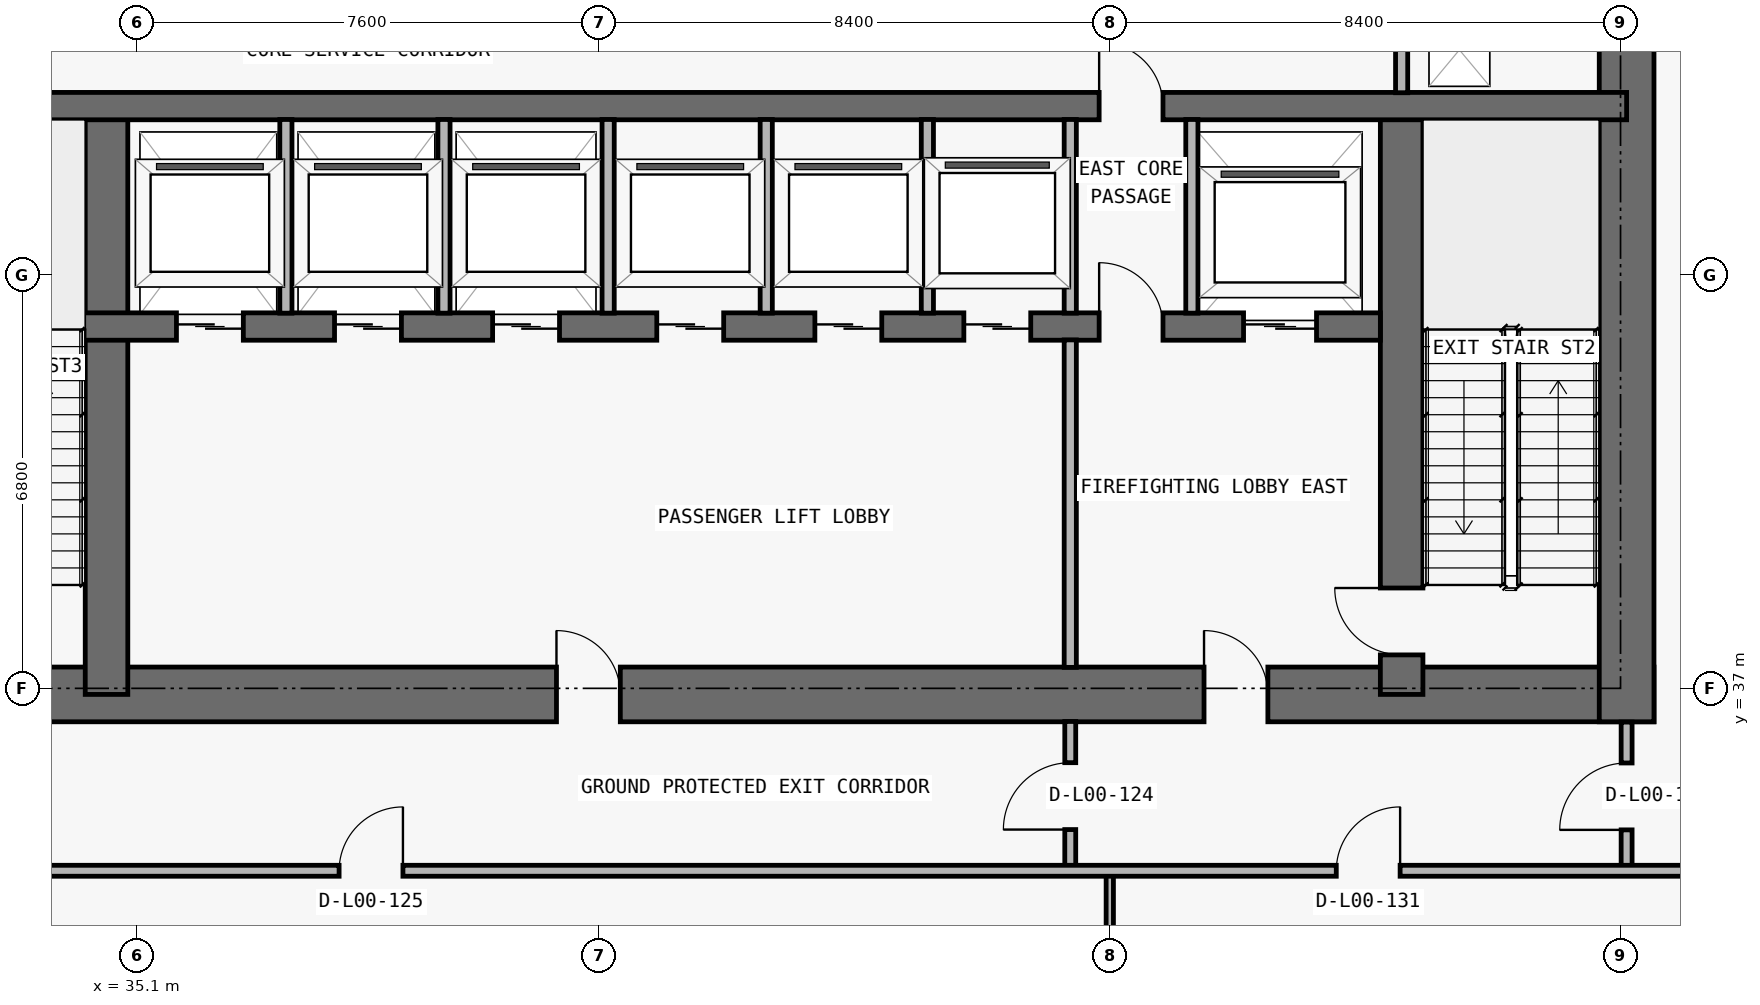
"""IFC4 building model, lengths in metres.
Left out: names, types, materials, properties, quantities, classifications, styles, units other than length and angle.
Written with IfcOpenShell. Run it as: python <this file> out.ifc"""

import sys

from ifc_helpers import new_model, si_unit, direction, frame, frame_2d, origin, place, context, subcontext, project, spatial, rectangle, extrude, element, fill, save


model = new_model("IFC4")
c1 = context("Model", 3, precision=1e-05, world=origin(), true_north=direction((0.0, 1.0)))
c2 = subcontext(c1, "Body", "Model", "MODEL_VIEW")
j1 = project(units=[si_unit("LENGTHUNIT", "METRE"), si_unit("PLANEANGLEUNIT", "RADIAN")], contexts=[c1])
p1 = place(None, origin())
s1 = spatial("IfcSite", under=j1, at=p1, CompositionType="ELEMENT")
p2 = place(p1, origin())
s2 = spatial("IfcBuilding", under=s1, at=p2, CompositionType="ELEMENT")
p3 = place(p2, origin())
s3 = spatial("IfcBuildingStorey", under=s2, at=p3, CompositionType="ELEMENT", Elevation=0.0)
p4 = place(p3, frame((17.75, 36.9, 0.0), z_axis=(0.0, 0.0, 1.0), x_axis=(1.0, 0.0, 0.0)))
e1 = element("IfcWall", 1, at=p4, inside=s3, PredefinedType="SHEAR", context=c2, shape_type="SweptSolid", body=[
    extrude(rectangle(XDim=42.3, YDim=0.9, at=frame_2d((21.15, 0.0))), origin(), (0.0, 0.0, 1.0), 5.1),
])
p5 = place(p4, frame((14.55, 0.0, 0.0)))
e2 = element("IfcOpeningElement", 2, at=p5, cuts=e1, PredefinedType="OPENING", context=c2, shape_type="SweptSolid", body=[
    extrude(rectangle(XDim=1.1, YDim=2.15, at=frame_2d((0.55, 1.075))), frame((0.0, 0.46, 0.0), z_axis=(0.0, -1.0, 0.0), x_axis=(1.0, 0.0, 0.0)), (0.0, 0.0, 1.0), 0.92),
])
p6 = place(p4, frame((6.4, 0.0, 0.0)))
e3 = element("IfcOpeningElement", 3, at=p6, cuts=e1, PredefinedType="OPENING", context=c2, shape_type="SweptSolid", body=[
    extrude(rectangle(XDim=1.05, YDim=2.15, at=frame_2d((0.525, 1.075))), frame((0.0, 0.46, 0.0), z_axis=(0.0, -1.0, 0.0), x_axis=(1.0, 0.0, 0.0)), (0.0, 0.0, 1.0), 0.92),
])
p7 = place(p4, frame((34.9, 0.0, 0.0)))
e4 = element("IfcOpeningElement", 4, at=p7, cuts=e1, PredefinedType="OPENING", context=c2, shape_type="SweptSolid", body=[
    extrude(rectangle(XDim=1.05, YDim=2.15, at=frame_2d((0.525, 1.075))), frame((0.0, 0.46, 0.0), z_axis=(0.0, -1.0, 0.0), x_axis=(1.0, 0.0, 0.0)), (0.0, 0.0, 1.0), 0.92),
])
p8 = place(p4, frame((11.012, 0.0, 0.0)))
e5 = element("IfcOpeningElement", 5, at=p8, cuts=e1, PredefinedType="OPENING", context=c2, shape_type="SweptSolid", body=[
    extrude(rectangle(XDim=1.05, YDim=2.15, at=frame_2d((0.525, 1.075))), frame((0.0, 0.46, 0.0), z_axis=(0.0, -1.0, 0.0), x_axis=(1.0, 0.0, 0.0)), (0.0, 0.0, 1.0), 0.92),
])
p9 = place(p4, frame((24.25, 0.0, 0.0)))
e6 = element("IfcOpeningElement", 6, at=p9, cuts=e1, PredefinedType="OPENING", context=c2, shape_type="SweptSolid", body=[
    extrude(rectangle(XDim=1.05, YDim=2.15, at=frame_2d((0.525, 1.075))), frame((0.0, 0.46, 0.0), z_axis=(0.0, -1.0, 0.0), x_axis=(1.0, 0.0, 0.0)), (0.0, 0.0, 1.0), 0.92),
])
p10 = place(p3, frame((59.6, 36.45, 0.0), z_axis=(0.0, 0.0, 1.0), x_axis=(0.0, 1.0, 0.0)))
e7 = element("IfcWall", 7, at=p10, inside=s3, PredefinedType="SHEAR", context=c2, shape_type="SweptSolid", body=[
    extrude(rectangle(XDim=14.15, YDim=0.9, at=frame_2d((7.075, 0.0))), origin(), (0.0, 0.0, 1.0), 5.1),
])
p11 = place(p3, frame((55.9, 36.9, 0.0), z_axis=(0.0, 0.0, 1.0), x_axis=(0.0, 1.0, 0.0)))
e8 = element("IfcWall", 8, at=p11, inside=s3, PredefinedType="SHEAR", context=c2, shape_type="SweptSolid", body=[
    extrude(rectangle(XDim=9.675, YDim=0.7, at=frame_2d((4.837, 0.0))), origin(), (0.0, 0.0, 1.0), 5.1),
])
p12 = place(p11, frame((0.65, 0.0, 0.0)))
e9 = element("IfcOpeningElement", 9, at=p12, cuts=e8, PredefinedType="OPENING", context=c2, shape_type="SweptSolid", body=[
    extrude(rectangle(XDim=1.1, YDim=2.15, at=frame_2d((0.55, 1.075))), frame((0.0, 0.36, 0.0), z_axis=(0.0, -1.0, 0.0), x_axis=(1.0, 0.0, 0.0)), (0.0, 0.0, 1.0), 0.72),
])
p13 = place(p3, frame((34.6, 36.9, 0.0), z_axis=(0.0, 0.0, 1.0), x_axis=(0.0, 1.0, 0.0)))
e10 = element("IfcWall", 10, at=p13, inside=s3, PredefinedType="SHEAR", context=c2, shape_type="SweptSolid", body=[
    extrude(rectangle(XDim=9.675, YDim=0.7, at=frame_2d((4.837, 0.0))), origin(), (0.0, 0.0, 1.0), 5.1),
])
p14 = place(p3, frame((22.25, 42.95, 0.0), z_axis=(0.0, 0.0, 1.0), x_axis=(1.0, 0.0, 0.0)))
e11 = element("IfcWall", 11, at=p14, inside=s3, PredefinedType="SHEAR", context=c2, shape_type="SweptSolid", body=[
    extrude(rectangle(XDim=33.3, YDim=0.45, at=frame_2d((16.65, 0.0))), origin(), (0.0, 0.0, 1.0), 5.1),
])
p15 = place(p14, frame((1.05, 0.0, 0.0)))
e12 = element("IfcOpeningElement", 12, at=p15, cuts=e11, PredefinedType="OPENING", context=c2, shape_type="SweptSolid", body=[
    extrude(rectangle(XDim=1.2, YDim=2.2, at=frame_2d((0.6, 1.1))), frame((0.0, 0.235, 0.0), z_axis=(0.0, -1.0, 0.0), x_axis=(1.0, 0.0, 0.0)), (0.0, 0.0, 1.0), 0.47),
])
p16 = place(p14, frame((31.05, 0.0, 0.0)))
e13 = element("IfcOpeningElement", 13, at=p16, cuts=e11, PredefinedType="OPENING", context=c2, shape_type="SweptSolid", body=[
    extrude(rectangle(XDim=1.2, YDim=2.2, at=frame_2d((0.6, 1.1))), frame((0.0, 0.235, 0.0), z_axis=(0.0, -1.0, 0.0), x_axis=(1.0, 0.0, 0.0)), (0.0, 0.0, 1.0), 0.47),
])
p17 = place(p14, frame((13.5, 0.0, 0.0)))
e14 = element("IfcOpeningElement", 14, at=p17, cuts=e11, PredefinedType="OPENING", context=c2, shape_type="SweptSolid", body=[
    extrude(rectangle(XDim=1.1, YDim=2.2, at=frame_2d((0.55, 1.1))), frame((0.0, 0.235, 0.0), z_axis=(0.0, -1.0, 0.0), x_axis=(1.0, 0.0, 0.0)), (0.0, 0.0, 1.0), 0.47),
])
p18 = place(p14, frame((16.1, 0.0, 0.0)))
e15 = element("IfcOpeningElement", 15, at=p18, cuts=e11, PredefinedType="OPENING", context=c2, shape_type="SweptSolid", body=[
    extrude(rectangle(XDim=1.1, YDim=2.2, at=frame_2d((0.55, 1.1))), frame((0.0, 0.235, 0.0), z_axis=(0.0, -1.0, 0.0), x_axis=(1.0, 0.0, 0.0)), (0.0, 0.0, 1.0), 0.47),
])
p19 = place(p14, frame((18.7, 0.0, 0.0)))
e16 = element("IfcOpeningElement", 16, at=p19, cuts=e11, PredefinedType="OPENING", context=c2, shape_type="SweptSolid", body=[
    extrude(rectangle(XDim=1.1, YDim=2.2, at=frame_2d((0.55, 1.1))), frame((0.0, 0.235, 0.0), z_axis=(0.0, -1.0, 0.0), x_axis=(1.0, 0.0, 0.0)), (0.0, 0.0, 1.0), 0.47),
])
p20 = place(p14, frame((21.4, 0.0, 0.0)))
e17 = element("IfcOpeningElement", 17, at=p20, cuts=e11, PredefinedType="OPENING", context=c2, shape_type="SweptSolid", body=[
    extrude(rectangle(XDim=1.1, YDim=2.2, at=frame_2d((0.55, 1.1))), frame((0.0, 0.235, 0.0), z_axis=(0.0, -1.0, 0.0), x_axis=(1.0, 0.0, 0.0)), (0.0, 0.0, 1.0), 0.47),
])
p21 = place(p14, frame((24.0, 0.0, 0.0)))
e18 = element("IfcOpeningElement", 18, at=p21, cuts=e11, PredefinedType="OPENING", context=c2, shape_type="SweptSolid", body=[
    extrude(rectangle(XDim=1.1, YDim=2.2, at=frame_2d((0.55, 1.1))), frame((0.0, 0.235, 0.0), z_axis=(0.0, -1.0, 0.0), x_axis=(1.0, 0.0, 0.0)), (0.0, 0.0, 1.0), 0.47),
])
p22 = place(p14, frame((26.45, 0.0, 0.0)))
e19 = element("IfcOpeningElement", 19, at=p22, cuts=e11, PredefinedType="OPENING", context=c2, shape_type="SweptSolid", body=[
    extrude(rectangle(XDim=1.1, YDim=2.2, at=frame_2d((0.55, 1.1))), frame((0.0, 0.235, 0.0), z_axis=(0.0, -1.0, 0.0), x_axis=(1.0, 0.0, 0.0)), (0.0, 0.0, 1.0), 0.47),
])
p23 = place(p14, frame((5.95, 0.0, 0.0)))
e20 = element("IfcOpeningElement", 20, at=p23, cuts=e11, PredefinedType="OPENING", context=c2, shape_type="SweptSolid", body=[
    extrude(rectangle(XDim=1.1, YDim=2.2, at=frame_2d((0.55, 1.1))), frame((0.0, 0.235, 0.0), z_axis=(0.0, -1.0, 0.0), x_axis=(1.0, 0.0, 0.0)), (0.0, 0.0, 1.0), 0.47),
])
p24 = place(p14, frame((3.625, 0.0, 0.0)))
e21 = element("IfcOpeningElement", 21, at=p24, cuts=e11, PredefinedType="OPENING", context=c2, shape_type="SweptSolid", body=[
    extrude(rectangle(XDim=1.05, YDim=2.15, at=frame_2d((0.525, 1.075))), frame((0.0, 0.235, 0.0), z_axis=(0.0, -1.0, 0.0), x_axis=(1.0, 0.0, 0.0)), (0.0, 0.0, 1.0), 0.47),
])
p25 = place(p14, frame((28.675, 0.0, 0.0)))
e22 = element("IfcOpeningElement", 22, at=p25, cuts=e11, PredefinedType="OPENING", context=c2, shape_type="SweptSolid", body=[
    extrude(rectangle(XDim=1.05, YDim=2.15, at=frame_2d((0.525, 1.075))), frame((0.0, 0.235, 0.0), z_axis=(0.0, -1.0, 0.0), x_axis=(1.0, 0.0, 0.0)), (0.0, 0.0, 1.0), 0.47),
])
p26 = place(p3, frame((18.2, 46.575, 0.0), z_axis=(0.0, 0.0, 1.0), x_axis=(1.0, 0.0, 0.0)))
e23 = element("IfcWall", 23, at=p26, inside=s3, PredefinedType="SHEAR", context=c2, shape_type="SweptSolid", body=[
    extrude(rectangle(XDim=41.4, YDim=0.45, at=frame_2d((20.7, 0.0))), origin(), (0.0, 0.0, 1.0), 5.1),
])
p27 = place(p26, frame((7.675, 0.0, 0.0)))
e24 = element("IfcOpeningElement", 24, at=p27, cuts=e23, PredefinedType="OPENING", context=c2, shape_type="SweptSolid", body=[
    extrude(rectangle(XDim=1.05, YDim=2.15, at=frame_2d((0.525, 1.075))), frame((0.0, 0.235, 0.0), z_axis=(0.0, -1.0, 0.0), x_axis=(1.0, 0.0, 0.0)), (0.0, 0.0, 1.0), 0.47),
])
p28 = place(p26, frame((32.725, 0.0, 0.0)))
e25 = element("IfcOpeningElement", 25, at=p28, cuts=e23, PredefinedType="OPENING", context=c2, shape_type="SweptSolid", body=[
    extrude(rectangle(XDim=1.05, YDim=2.15, at=frame_2d((0.525, 1.075))), frame((0.0, 0.235, 0.0), z_axis=(0.0, -1.0, 0.0), x_axis=(1.0, 0.0, 0.0)), (0.0, 0.0, 1.0), 0.47),
])
for number, where, z_axis, x_axis in (
    (26, (37.55, 43.17, 0.0), (0.0, 0.0, 1.0), (0.0, 1.0, 0.0)),
    (27, (40.15, 43.17, 0.0), (0.0, 0.0, 1.0), (0.0, 1.0, 0.0)),
    (28, (42.85, 43.17, 0.0), (0.0, 0.0, 1.0), (0.0, 1.0, 0.0)),
    (29, (45.45, 43.17, 0.0), (0.0, 0.0, 1.0), (0.0, 1.0, 0.0)),
    (30, (48.1, 43.17, 0.0), (0.0, 0.0, 1.0), (0.0, 1.0, 0.0)),
):
    element("IfcWall", number, at=place(p3, frame(where, z_axis=z_axis, x_axis=x_axis)), inside=s3, PredefinedType="PARTITIONING", context=c2, shape_type="SweptSolid", body=[
        extrude(rectangle(XDim=3.185, YDim=0.2, at=frame_2d((1.593, 0.0))), origin(), (0.0, 0.0, 1.0), 5.1),
    ])
p29 = place(p3, frame((50.45, 34.0, 0.0), z_axis=(0.0, 0.0, 1.0), x_axis=(0.0, 1.0, 0.0)))
e31 = element("IfcWall", 31, at=p29, inside=s3, PredefinedType="PARTITIONING", context=c2, shape_type="SweptSolid", body=[
    extrude(rectangle(XDim=2.455, YDim=0.18, at=frame_2d((1.228, 0.0))), origin(), (0.0, 0.0, 1.0), 5.1),
])
p30 = place(p29, frame((0.677, 0.0, 0.0)))
e32 = element("IfcOpeningElement", 32, at=p30, cuts=e31, PredefinedType="OPENING", context=c2, shape_type="SweptSolid", body=[
    extrude(rectangle(XDim=1.1, YDim=2.15, at=frame_2d((0.55, 1.075))), frame((0.0, 0.1, 0.0), z_axis=(0.0, -1.0, 0.0), x_axis=(1.0, 0.0, 0.0)), (0.0, 0.0, 1.0), 0.2),
])
p31 = place(p3, frame((50.45, 37.345, 0.0), z_axis=(0.0, 0.0, 1.0), x_axis=(0.0, 1.0, 0.0)))
e33 = element("IfcWall", 33, at=p31, inside=s3, PredefinedType="PARTITIONING", context=c2, shape_type="SweptSolid", body=[
    extrude(rectangle(XDim=5.385, YDim=0.2, at=frame_2d((2.692, 0.0))), origin(), (0.0, 0.0, 1.0), 5.1),
])
p32 = place(p3, frame((50.45, 43.17, 0.0), z_axis=(0.0, 0.0, 1.0), x_axis=(0.0, 1.0, 0.0)))
e34 = element("IfcWall", 34, at=p32, inside=s3, PredefinedType="PARTITIONING", context=c2, shape_type="SweptSolid", body=[
    extrude(rectangle(XDim=3.185, YDim=0.2, at=frame_2d((1.593, 0.0))), origin(), (0.0, 0.0, 1.0), 5.1),
])
p33 = place(p3, frame((51.1, 0.295, 0.0), z_axis=(0.0, 0.0, 1.0), x_axis=(0.0, 1.0, 0.0)))
e35 = element("IfcWall", 35, at=p33, inside=s3, PredefinedType="PARTITIONING", context=c2, shape_type="SweptSolid", body=[
    extrude(rectangle(XDim=33.705, YDim=0.12, at=frame_2d((16.853, 0.0))), origin(), (0.0, 0.0, 1.0), 4.064),
])
p34 = place(p3, frame((52.45, 43.17, 0.0), z_axis=(0.0, 0.0, 1.0), x_axis=(0.0, 1.0, 0.0)))
e36 = element("IfcWall", 36, at=p34, inside=s3, PredefinedType="PARTITIONING", context=c2, shape_type="SweptSolid", body=[
    extrude(rectangle(XDim=3.185, YDim=0.2, at=frame_2d((1.593, 0.0))), origin(), (0.0, 0.0, 1.0), 5.1),
])
p35 = place(p3, frame((55.9, 46.795, 0.0), z_axis=(0.0, 0.0, 1.0), x_axis=(0.0, 1.0, 0.0)))
e37 = element("IfcWall", 37, at=p35, inside=s3, PredefinedType="PARTITIONING", context=c2, shape_type="SweptSolid", body=[
    extrude(rectangle(XDim=2.91, YDim=0.2, at=frame_2d((1.455, 0.0))), origin(), (0.0, 0.0, 1.0), 5.1),
])
p36 = place(p3, frame((59.6, 34.0, 0.0), z_axis=(0.0, 0.0, 1.0), x_axis=(0.0, 1.0, 0.0)))
e38 = element("IfcWall", 38, at=p36, inside=s3, PredefinedType="PARTITIONING", context=c2, shape_type="SweptSolid", body=[
    extrude(rectangle(XDim=2.445, YDim=0.18, at=frame_2d((1.223, 0.0))), origin(), (0.0, 0.0, 1.0), 5.1),
])
p37 = place(p36, frame((0.673, 0.0, 0.0)))
e39 = element("IfcOpeningElement", 39, at=p37, cuts=e38, PredefinedType="OPENING", context=c2, shape_type="SweptSolid", body=[
    extrude(rectangle(XDim=1.1, YDim=2.15, at=frame_2d((0.55, 1.075))), frame((0.0, 0.1, 0.0), z_axis=(0.0, -1.0, 0.0), x_axis=(1.0, 0.0, 0.0)), (0.0, 0.0, 1.0), 0.2),
])
p38 = place(p3, frame((0.295, 34.0, 0.0), z_axis=(0.0, 0.0, 1.0), x_axis=(1.0, 0.0, 0.0)))
e40 = element("IfcWall", 40, at=p38, inside=s3, PredefinedType="PARTITIONING", context=c2, shape_type="SweptSolid", body=[
    extrude(rectangle(XDim=69.305, YDim=0.18, at=frame_2d((34.653, 0.0))), origin(), (0.0, 0.0, 1.0), 5.1),
])
p39 = place(p38, frame((38.13, 0.0, 0.0)))
e41 = element("IfcOpeningElement", 41, at=p39, cuts=e40, PredefinedType="OPENING", context=c2, shape_type="SweptSolid", body=[
    extrude(rectangle(XDim=1.05, YDim=2.15, at=frame_2d((0.525, 1.075))), frame((0.0, 0.1, 0.0), z_axis=(0.0, -1.0, 0.0), x_axis=(1.0, 0.0, 0.0)), (0.0, 0.0, 1.0), 0.2),
])
p40 = place(p38, frame((12.752, 0.0, 0.0)))
e42 = element("IfcOpeningElement", 42, at=p40, cuts=e40, PredefinedType="OPENING", context=c2, shape_type="SweptSolid", body=[
    extrude(rectangle(XDim=0.9, YDim=2.15, at=frame_2d((0.45, 1.075))), frame((0.0, 0.1, 0.0), z_axis=(0.0, -1.0, 0.0), x_axis=(1.0, 0.0, 0.0)), (0.0, 0.0, 1.0), 0.2),
])
p41 = place(p38, frame((54.53, 0.0, 0.0)))
e43 = element("IfcOpeningElement", 43, at=p41, cuts=e40, PredefinedType="OPENING", context=c2, shape_type="SweptSolid", body=[
    extrude(rectangle(XDim=1.05, YDim=2.15, at=frame_2d((0.525, 1.075))), frame((0.0, 0.1, 0.0), z_axis=(0.0, -1.0, 0.0), x_axis=(1.0, 0.0, 0.0)), (0.0, 0.0, 1.0), 0.2),
])
p42 = place(p16, origin())
e44 = element("IfcDoor", 44, at=p42, inside=s3, OperationType="DOUBLE_DOOR_SLIDING", PredefinedType="DOOR", context=c2, shape_type="SweptSolid", body=[
    extrude(rectangle(XDim=1.2, YDim=2.2, at=frame_2d((0.6, 1.1))), frame((0.0, 0.025, 0.0), z_axis=(0.0, -1.0, 0.0), x_axis=(1.0, 0.0, 0.0)), (0.0, 0.0, 1.0), 0.05),
])
fill(e13, e44)
p43 = place(p17, origin())
e45 = element("IfcDoor", 45, at=p43, inside=s3, OperationType="DOUBLE_DOOR_SLIDING", PredefinedType="DOOR", context=c2, shape_type="SweptSolid", body=[
    extrude(rectangle(XDim=1.1, YDim=2.2, at=frame_2d((0.55, 1.1))), frame((0.0, 0.025, 0.0), z_axis=(0.0, -1.0, 0.0), x_axis=(1.0, 0.0, 0.0)), (0.0, 0.0, 1.0), 0.05),
])
fill(e14, e45)
p44 = place(p18, origin())
e46 = element("IfcDoor", 46, at=p44, inside=s3, OperationType="DOUBLE_DOOR_SLIDING", PredefinedType="DOOR", context=c2, shape_type="SweptSolid", body=[
    extrude(rectangle(XDim=1.1, YDim=2.2, at=frame_2d((0.55, 1.1))), frame((0.0, 0.025, 0.0), z_axis=(0.0, -1.0, 0.0), x_axis=(1.0, 0.0, 0.0)), (0.0, 0.0, 1.0), 0.05),
])
fill(e15, e46)
p45 = place(p19, origin())
e47 = element("IfcDoor", 47, at=p45, inside=s3, OperationType="DOUBLE_DOOR_SLIDING", PredefinedType="DOOR", context=c2, shape_type="SweptSolid", body=[
    extrude(rectangle(XDim=1.1, YDim=2.2, at=frame_2d((0.55, 1.1))), frame((0.0, 0.025, 0.0), z_axis=(0.0, -1.0, 0.0), x_axis=(1.0, 0.0, 0.0)), (0.0, 0.0, 1.0), 0.05),
])
fill(e16, e47)
p46 = place(p20, origin())
e48 = element("IfcDoor", 48, at=p46, inside=s3, OperationType="DOUBLE_DOOR_SLIDING", PredefinedType="DOOR", context=c2, shape_type="SweptSolid", body=[
    extrude(rectangle(XDim=1.1, YDim=2.2, at=frame_2d((0.55, 1.1))), frame((0.0, 0.025, 0.0), z_axis=(0.0, -1.0, 0.0), x_axis=(1.0, 0.0, 0.0)), (0.0, 0.0, 1.0), 0.05),
])
fill(e17, e48)
p47 = place(p21, origin())
e49 = element("IfcDoor", 49, at=p47, inside=s3, OperationType="DOUBLE_DOOR_SLIDING", PredefinedType="DOOR", context=c2, shape_type="SweptSolid", body=[
    extrude(rectangle(XDim=1.1, YDim=2.2, at=frame_2d((0.55, 1.1))), frame((0.0, 0.025, 0.0), z_axis=(0.0, -1.0, 0.0), x_axis=(1.0, 0.0, 0.0)), (0.0, 0.0, 1.0), 0.05),
])
fill(e18, e49)
p48 = place(p22, origin())
e50 = element("IfcDoor", 50, at=p48, inside=s3, OperationType="DOUBLE_DOOR_SLIDING", PredefinedType="DOOR", context=c2, shape_type="SweptSolid", body=[
    extrude(rectangle(XDim=1.1, YDim=2.2, at=frame_2d((0.55, 1.1))), frame((0.0, 0.025, 0.0), z_axis=(0.0, -1.0, 0.0), x_axis=(1.0, 0.0, 0.0)), (0.0, 0.0, 1.0), 0.05),
])
fill(e19, e50)
p49 = place(p7, origin())
e51 = element("IfcDoor", 51, at=p49, inside=s3, OperationType="SINGLE_SWING_LEFT", PredefinedType="DOOR", context=c2, shape_type="SweptSolid", body=[
    extrude(rectangle(XDim=1.05, YDim=2.15, at=frame_2d((0.525, 1.075))), frame((0.0, 0.025, 0.0), z_axis=(0.0, -1.0, 0.0), x_axis=(1.0, 0.0, 0.0)), (0.0, 0.0, 1.0), 0.05),
])
fill(e4, e51)
p50 = place(p12, origin())
e52 = element("IfcDoor", 52, at=p50, inside=s3, OperationType="SINGLE_SWING_RIGHT", PredefinedType="DOOR", context=c2, shape_type="SweptSolid", body=[
    extrude(rectangle(XDim=1.1, YDim=2.15, at=frame_2d((0.55, 1.075))), frame((0.0, 0.025, 0.0), z_axis=(0.0, -1.0, 0.0), x_axis=(1.0, 0.0, 0.0)), (0.0, 0.0, 1.0), 0.05),
])
fill(e9, e52)
p51 = place(p25, origin())
e53 = element("IfcDoor", 53, at=p51, inside=s3, OperationType="SINGLE_SWING_LEFT", PredefinedType="DOOR", context=c2, shape_type="SweptSolid", body=[
    extrude(rectangle(XDim=1.05, YDim=2.15, at=frame_2d((0.525, 1.075))), frame((0.0, 0.025, 0.0), z_axis=(0.0, -1.0, 0.0), x_axis=(1.0, 0.0, 0.0)), (0.0, 0.0, 1.0), 0.05),
])
fill(e22, e53)
p52 = place(p9, origin())
e54 = element("IfcDoor", 54, at=p52, inside=s3, OperationType="SINGLE_SWING_LEFT", PredefinedType="DOOR", context=c2, shape_type="SweptSolid", body=[
    extrude(rectangle(XDim=1.05, YDim=2.15, at=frame_2d((0.525, 1.075))), frame((0.0, 0.025, 0.0), z_axis=(0.0, -1.0, 0.0), x_axis=(1.0, 0.0, 0.0)), (0.0, 0.0, 1.0), 0.05),
])
fill(e6, e54)
p53 = place(p28, origin())
e55 = element("IfcDoor", 55, at=p53, inside=s3, OperationType="SINGLE_SWING_LEFT", PredefinedType="DOOR", context=c2, shape_type="SweptSolid", body=[
    extrude(rectangle(XDim=1.05, YDim=2.15, at=frame_2d((0.525, 1.075))), frame((0.0, 0.025, 0.0), z_axis=(0.0, -1.0, 0.0), x_axis=(1.0, 0.0, 0.0)), (0.0, 0.0, 1.0), 0.05),
])
fill(e25, e55)
p54 = place(p30, origin())
e56 = element("IfcDoor", 56, at=p54, inside=s3, OperationType="SINGLE_SWING_LEFT", PredefinedType="DOOR", context=c2, shape_type="SweptSolid", body=[
    extrude(rectangle(XDim=1.1, YDim=2.15, at=frame_2d((0.55, 1.075))), frame((0.0, 0.025, 0.0), z_axis=(0.0, -1.0, 0.0), x_axis=(1.0, 0.0, 0.0)), (0.0, 0.0, 1.0), 0.05),
])
fill(e32, e56)
p55 = place(p39, origin())
e57 = element("IfcDoor", 57, at=p55, inside=s3, OperationType="SINGLE_SWING_RIGHT", PredefinedType="DOOR", context=c2, shape_type="SweptSolid", body=[
    extrude(rectangle(XDim=1.05, YDim=2.15, at=frame_2d((0.525, 1.075))), frame((0.0, 0.025, 0.0), z_axis=(0.0, -1.0, 0.0), x_axis=(1.0, 0.0, 0.0)), (0.0, 0.0, 1.0), 0.05),
])
fill(e41, e57)
p56 = place(p41, origin())
e58 = element("IfcDoor", 58, at=p56, inside=s3, OperationType="SINGLE_SWING_RIGHT", PredefinedType="DOOR", context=c2, shape_type="SweptSolid", body=[
    extrude(rectangle(XDim=1.05, YDim=2.15, at=frame_2d((0.525, 1.075))), frame((0.0, 0.025, 0.0), z_axis=(0.0, -1.0, 0.0), x_axis=(1.0, 0.0, 0.0)), (0.0, 0.0, 1.0), 0.05),
])
fill(e43, e58)
p57 = place(p37, origin())
e59 = element("IfcDoor", 59, at=p57, inside=s3, OperationType="SINGLE_SWING_LEFT", PredefinedType="DOOR", context=c2, shape_type="SweptSolid", body=[
    extrude(rectangle(XDim=1.1, YDim=2.15, at=frame_2d((0.55, 1.075))), frame((0.0, 0.025, 0.0), z_axis=(0.0, -1.0, 0.0), x_axis=(1.0, 0.0, 0.0)), (0.0, 0.0, 1.0), 0.05),
])
fill(e39, e59)
save(model, sys.argv[1])
